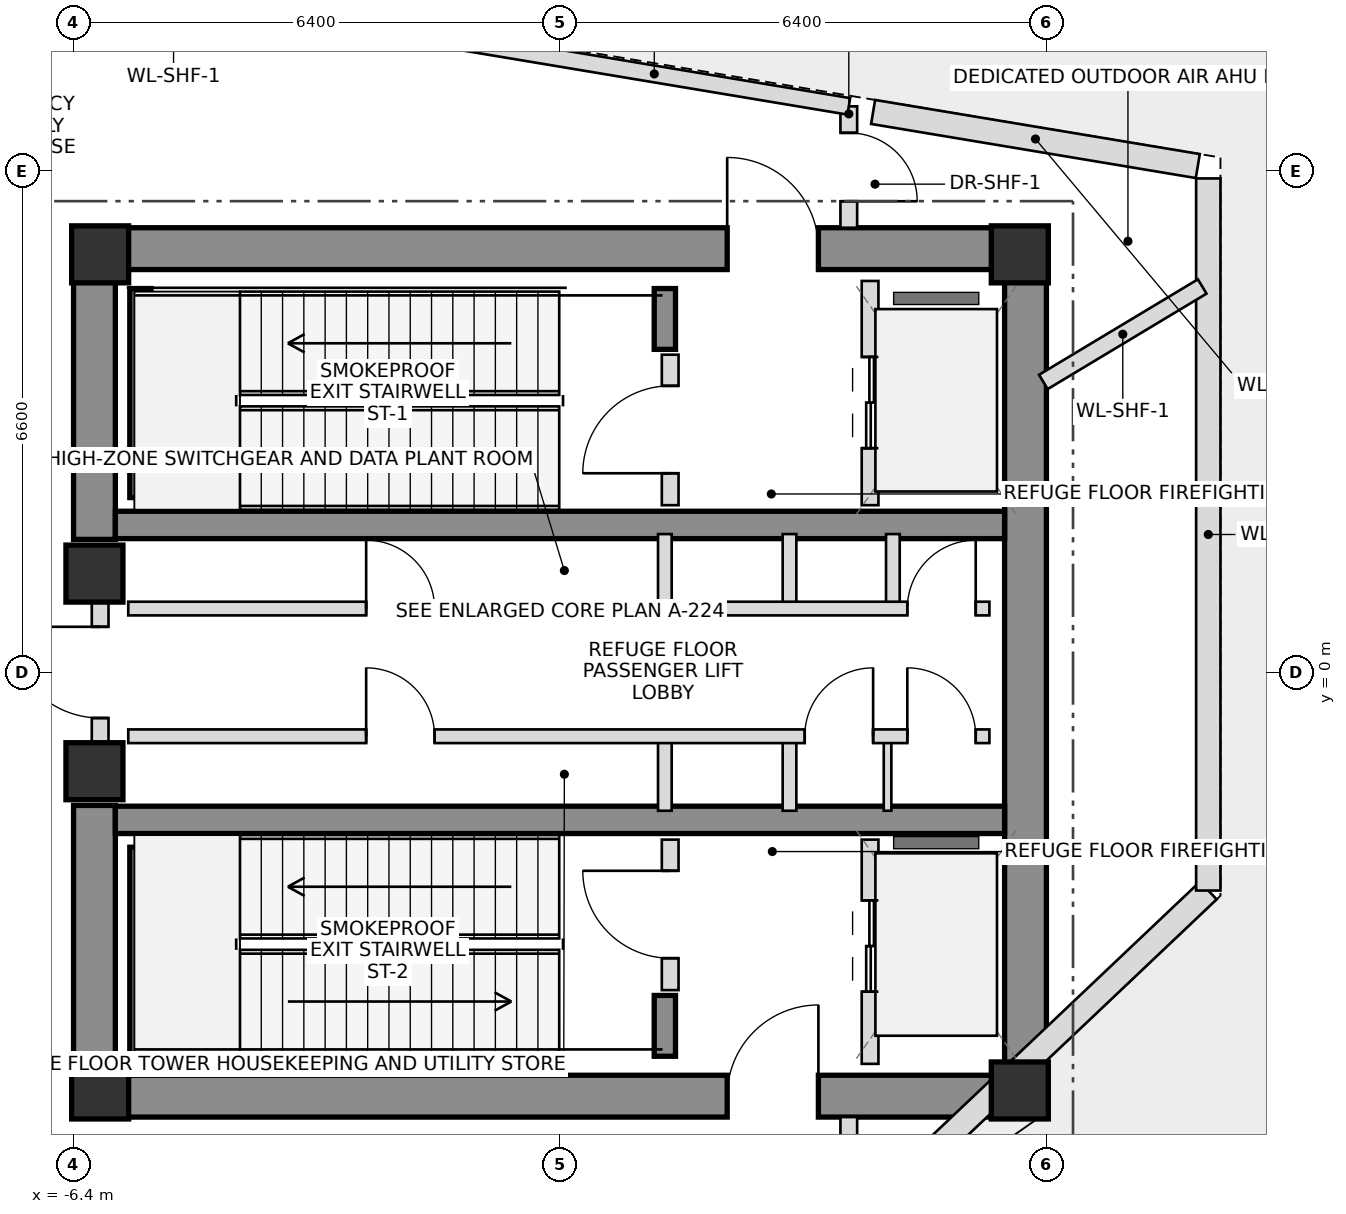
"""IFC4 building model, lengths in metres.
Left out: names, types, materials, properties, quantities, classifications, styles, units other than length and angle.
Written with IfcOpenShell. Run it as: python <this file> out.ifc"""

import sys

from ifc_helpers import new_model, si_unit, direction, frame, frame_2d, origin, origin_2d, place, context, subcontext, project, spatial, rectangle, extrude, source, transform, mapped, element, fill, save


model = new_model("IFC4")
c1 = context("Model", 3, precision=1e-05, world=origin(), true_north=direction((0.0, 1.0)))
c2 = subcontext(c1, "Body", "Model", "MODEL_VIEW")
j1 = project(units=[si_unit("LENGTHUNIT", "METRE"), si_unit("PLANEANGLEUNIT", "RADIAN")], contexts=[c1])
p1 = place(None, origin())
s1 = spatial("IfcSite", under=j1, at=p1, CompositionType="ELEMENT")
p2 = place(p1, origin())
s2 = spatial("IfcBuilding", under=s1, at=p2, CompositionType="ELEMENT")
p3 = place(p2, frame((0.0, 0.0, 252.45)))
s3 = spatial("IfcBuildingStorey", under=s2, at=p3, CompositionType="ELEMENT", Elevation=252.45)
m1 = source(origin(), c2, "Body", "SweptSolid", [
    extrude(rectangle(XDim=0.75, YDim=0.75, at=origin_2d()), origin(), (0.0, 0.0, 1.0), 5.1),
])
for number, where, z_axis, x_axis in (
    (1, (-6.05, -5.5, 0.0), (0.0, 0.0, 1.0), (1.0, 0.0, 0.0)),
    (2, (6.05, -5.5, 0.0), (0.0, 0.0, 1.0), (1.0, 0.0, 0.0)),
    (3, (6.05, 5.5, 0.0), (0.0, 0.0, 1.0), (1.0, 0.0, 0.0)),
    (4, (-6.05, 5.5, 0.0), (0.0, 0.0, 1.0), (1.0, 0.0, 0.0)),
):
    element("IfcColumn", number, at=place(p3, frame(where, z_axis=z_axis, x_axis=x_axis)), inside=s3, PredefinedType="COLUMN", context=c2, shape_type="MappedRepresentation", body=[
        mapped(m1, transform((0.0, 0.0, 0.0), scale=1.0)),
    ])
p4 = place(p3, frame((-6.4, 5.575, 0.0), z_axis=(0.0, 0.0, 1.0), x_axis=(1.0, 0.0, 0.0)))
e5 = element("IfcWall", 5, at=p4, inside=s3, PredefinedType="SHEAR", context=c2, shape_type="SweptSolid", body=[
    extrude(rectangle(XDim=12.8, YDim=0.55, at=frame_2d((6.4, 0.0))), origin(), (0.0, 0.0, 1.0), 5.1),
])
p5 = place(p4, frame((8.6, 0.0, 0.0)))
e6 = element("IfcOpeningElement", 6, at=p5, cuts=e5, PredefinedType="OPENING", context=c2, shape_type="SweptSolid", body=[
    extrude(rectangle(XDim=1.2, YDim=2.2, at=frame_2d((0.6, 1.1))), frame((0.0, 0.285, 0.0), z_axis=(0.0, -1.0, 0.0), x_axis=(1.0, 0.0, 0.0)), (0.0, 0.0, 1.0), 0.57),
])
p6 = place(p3, frame((-6.4, -5.575, 0.0), z_axis=(0.0, 0.0, 1.0), x_axis=(1.0, 0.0, 0.0)))
e7 = element("IfcWall", 7, at=p6, inside=s3, PredefinedType="SHEAR", context=c2, shape_type="SweptSolid", body=[
    extrude(rectangle(XDim=12.8, YDim=0.55, at=frame_2d((6.4, 0.0))), origin(), (0.0, 0.0, 1.0), 5.1),
])
p7 = place(p6, frame((8.6, 0.0, 0.0)))
e8 = element("IfcOpeningElement", 8, at=p7, cuts=e7, PredefinedType="OPENING", context=c2, shape_type="SweptSolid", body=[
    extrude(rectangle(XDim=1.2, YDim=2.2, at=frame_2d((0.6, 1.1))), frame((0.0, 0.285, 0.0), z_axis=(0.0, -1.0, 0.0), x_axis=(1.0, 0.0, 0.0)), (0.0, 0.0, 1.0), 0.57),
])
p8 = place(p3, frame((6.125, -5.3, 0.0), z_axis=(0.0, 0.0, 1.0), x_axis=(0.0, 1.0, 0.0)))
e9 = element("IfcWall", 9, at=p8, inside=s3, PredefinedType="SHEAR", context=c2, shape_type="SweptSolid", body=[
    extrude(rectangle(XDim=10.6, YDim=0.55, at=frame_2d((5.3, 0.0))), origin(), (0.0, 0.0, 1.0), 5.1),
])
for number, where, z_axis, x_axis in (
    (10, (-6.125, -5.3, 0.0), (0.0, 0.0, 1.0), (0.0, 1.0, 0.0)),
    (11, (-6.125, 1.75, 0.0), (0.0, 0.0, 1.0), (0.0, 1.0, 0.0)),
):
    element("IfcWall", number, at=place(p3, frame(where, z_axis=z_axis, x_axis=x_axis)), inside=s3, PredefinedType="SHEAR", context=c2, shape_type="SweptSolid", body=[
        extrude(rectangle(XDim=3.55, YDim=0.55, at=frame_2d((1.775, 0.0))), origin(), (0.0, 0.0, 1.0), 5.1),
    ])
for number, where, z_axis, x_axis in (
    (12, (-5.85, 1.94, 0.0), (0.0, 0.0, 1.0), (1.0, 0.0, 0.0)),
    (13, (-5.85, -1.94, 0.0), (0.0, 0.0, 1.0), (1.0, 0.0, 0.0)),
):
    element("IfcWall", number, at=place(p3, frame(where, z_axis=z_axis, x_axis=x_axis)), inside=s3, PredefinedType="SHEAR", context=c2, shape_type="SweptSolid", body=[
        extrude(rectangle(XDim=11.7, YDim=0.36, at=frame_2d((5.85, 0.0))), origin(), (0.0, 0.0, 1.0), 5.1),
    ])
p9 = place(p3, frame((-5.52, 2.3, 0.0), z_axis=(0.0, 0.0, 1.0), x_axis=(0.0, 1.0, 0.0)))
e14 = element("IfcWall", 14, at=p9, inside=s3, PredefinedType="SHEAR", context=c2, shape_type="SweptSolid", body=[
    extrude(rectangle(XDim=2.75, YDim=0.28, at=frame_2d((1.375, 0.0))), origin(), (0.0, 0.0, 1.0), 5.1),
])
p10 = place(p3, frame((1.38, 4.25, 0.0), z_axis=(0.0, 0.0, 1.0), x_axis=(0.0, 1.0, 0.0)))
e15 = element("IfcWall", 15, at=p10, inside=s3, PredefinedType="SHEAR", context=c2, shape_type="SweptSolid", body=[
    extrude(rectangle(XDim=0.8, YDim=0.28, at=frame_2d((0.4, 0.0))), origin(), (0.0, 0.0, 1.0), 5.1),
])
p11 = place(p3, frame((-5.52, -5.05, 0.0), z_axis=(0.0, 0.0, 1.0), x_axis=(0.0, 1.0, 0.0)))
e16 = element("IfcWall", 16, at=p11, inside=s3, PredefinedType="SHEAR", context=c2, shape_type="SweptSolid", body=[
    extrude(rectangle(XDim=2.75, YDim=0.28, at=frame_2d((1.375, 0.0))), origin(), (0.0, 0.0, 1.0), 5.1),
])
p12 = place(p3, frame((1.38, -5.05, 0.0), z_axis=(0.0, 0.0, 1.0), x_axis=(0.0, 1.0, 0.0)))
e17 = element("IfcWall", 17, at=p12, inside=s3, PredefinedType="SHEAR", context=c2, shape_type="SweptSolid", body=[
    extrude(rectangle(XDim=0.8, YDim=0.28, at=frame_2d((0.4, 0.0))), origin(), (0.0, 0.0, 1.0), 5.1),
])
for number, where, z_axis, x_axis in (
    (18, (-6.125, -1.3, 0.0), (0.0, 0.0, 1.0), (1.0, 0.0, 0.0)),
    (19, (-6.125, 1.3, 0.0), (0.0, 0.0, 1.0), (1.0, 0.0, 0.0)),
):
    element("IfcColumn", number, at=place(p3, frame(where, z_axis=z_axis, x_axis=x_axis)), inside=s3, PredefinedType="COLUMN", context=c2, shape_type="MappedRepresentation", body=[
        mapped(m1, transform((0.0, 0.0, 0.0), scale=1.0)),
    ])
p13 = place(p3, frame((-6.05, -0.95, 0.0), z_axis=(0.0, 0.0, 1.0), x_axis=(0.0, 1.0, 0.0)))
e20 = element("IfcWall", 20, at=p13, inside=s3, PredefinedType="PLUMBINGWALL", context=c2, shape_type="SweptSolid", body=[
    extrude(rectangle(XDim=1.9, YDim=0.22, at=frame_2d((0.95, 0.0))), origin(), (0.0, 0.0, 1.0), 3.88),
])
p14 = place(p13, frame((0.35, 0.0, 0.0)))
e21 = element("IfcOpeningElement", 21, at=p14, cuts=e20, PredefinedType="OPENING", context=c2, shape_type="SweptSolid", body=[
    extrude(rectangle(XDim=1.2, YDim=2.2, at=frame_2d((0.6, 1.1))), frame((0.0, 0.12, 0.0), z_axis=(0.0, -1.0, 0.0), x_axis=(1.0, 0.0, 0.0)), (0.0, 0.0, 1.0), 0.24),
])
p15 = place(p3, frame((1.45, 2.2, 0.0), z_axis=(0.0, 0.0, 1.0), x_axis=(0.0, 1.0, 0.0)))
e22 = element("IfcWall", 22, at=p15, inside=s3, PredefinedType="PLUMBINGWALL", context=c2, shape_type="SweptSolid", body=[
    extrude(rectangle(XDim=1.98, YDim=0.22, at=frame_2d((0.99, 0.0))), origin(), (0.0, 0.0, 1.0), 4.9),
])
p16 = place(p15, frame((0.42, 0.0, 0.0)))
e23 = element("IfcOpeningElement", 23, at=p16, cuts=e22, PredefinedType="OPENING", context=c2, shape_type="SweptSolid", body=[
    extrude(rectangle(XDim=1.15, YDim=2.15, at=frame_2d((0.575, 1.075))), frame((0.0, 0.12, 0.0), z_axis=(0.0, -1.0, 0.0), x_axis=(1.0, 0.0, 0.0)), (0.0, 0.0, 1.0), 0.24),
])
p17 = place(p3, frame((4.08, 2.2, 0.0), z_axis=(0.0, 0.0, 1.0), x_axis=(0.0, 1.0, 0.0)))
e24 = element("IfcWall", 24, at=p17, inside=s3, PredefinedType="PLUMBINGWALL", context=c2, shape_type="SweptSolid", body=[
    extrude(rectangle(XDim=2.95, YDim=0.22, at=frame_2d((1.475, 0.0))), origin(), (0.0, 0.0, 1.0), 4.9),
])
p18 = place(p17, frame((0.75, 0.0, 0.0)))
e25 = element("IfcOpeningElement", 25, at=p18, cuts=e24, PredefinedType="OPENING", context=c2, shape_type="SweptSolid", body=[
    extrude(rectangle(XDim=1.2, YDim=2.25, at=frame_2d((0.6, 1.125))), frame((0.0, 0.12, 0.0), z_axis=(0.0, -1.0, 0.0), x_axis=(1.0, 0.0, 0.0)), (0.0, 0.0, 1.0), 0.24),
])
p19 = place(p3, frame((1.45, -4.18, 0.0), z_axis=(0.0, 0.0, 1.0), x_axis=(0.0, 1.0, 0.0)))
e26 = element("IfcWall", 26, at=p19, inside=s3, PredefinedType="PLUMBINGWALL", context=c2, shape_type="SweptSolid", body=[
    extrude(rectangle(XDim=1.98, YDim=0.22, at=frame_2d((0.99, 0.0))), origin(), (0.0, 0.0, 1.0), 4.9),
])
p20 = place(p19, frame((0.42, 0.0, 0.0)))
e27 = element("IfcOpeningElement", 27, at=p20, cuts=e26, PredefinedType="OPENING", context=c2, shape_type="SweptSolid", body=[
    extrude(rectangle(XDim=1.15, YDim=2.15, at=frame_2d((0.575, 1.075))), frame((0.0, 0.12, 0.0), z_axis=(0.0, -1.0, 0.0), x_axis=(1.0, 0.0, 0.0)), (0.0, 0.0, 1.0), 0.24),
])
p21 = place(p3, frame((4.08, -5.15, 0.0), z_axis=(0.0, 0.0, 1.0), x_axis=(0.0, 1.0, 0.0)))
e28 = element("IfcWall", 28, at=p21, inside=s3, PredefinedType="PLUMBINGWALL", context=c2, shape_type="SweptSolid", body=[
    extrude(rectangle(XDim=2.95, YDim=0.22, at=frame_2d((1.475, 0.0))), origin(), (0.0, 0.0, 1.0), 4.9),
])
p22 = place(p21, frame((0.95, 0.0, 0.0)))
e29 = element("IfcOpeningElement", 29, at=p22, cuts=e28, PredefinedType="OPENING", context=c2, shape_type="SweptSolid", body=[
    extrude(rectangle(XDim=1.2, YDim=2.25, at=frame_2d((0.6, 1.125))), frame((0.0, 0.12, 0.0), z_axis=(0.0, -1.0, 0.0), x_axis=(1.0, 0.0, 0.0)), (0.0, 0.0, 1.0), 0.24),
])
for number, where, z_axis, x_axis in (
    (30, (1.38, 0.84, 0.0), (0.0, 0.0, 1.0), (0.0, 1.0, 0.0)),
    (31, (1.38, -1.82, 0.0), (0.0, 0.0, 1.0), (0.0, 1.0, 0.0)),
    (32, (3.02, 0.84, 0.0), (0.0, 0.0, 1.0), (0.0, 1.0, 0.0)),
    (33, (4.38, 0.84, 0.0), (0.0, 0.0, 1.0), (0.0, 1.0, 0.0)),
    (34, (3.02, -1.82, 0.0), (0.0, 0.0, 1.0), (0.0, 1.0, 0.0)),
):
    element("IfcWall", number, at=place(p3, frame(where, z_axis=z_axis, x_axis=x_axis)), inside=s3, PredefinedType="PLUMBINGWALL", context=c2, shape_type="SweptSolid", body=[
        extrude(rectangle(XDim=0.98, YDim=0.18, at=frame_2d((0.49, 0.0))), origin(), (0.0, 0.0, 1.0), 4.9),
    ])
p23 = place(p3, frame((4.31, -1.82, 0.0), z_axis=(0.0, 0.0, 1.0), x_axis=(0.0, 1.0, 0.0)))
e35 = element("IfcWall", 35, at=p23, inside=s3, PredefinedType="PARTITIONING", context=c2, shape_type="SweptSolid", body=[
    extrude(rectangle(XDim=0.98, YDim=0.1, at=frame_2d((0.49, 0.0))), origin(), (0.0, 0.0, 1.0), 4.9),
])
p24 = place(p3, frame((-5.68, 0.84, 0.0), z_axis=(0.0, 0.0, 1.0), x_axis=(1.0, 0.0, 0.0)))
e36 = element("IfcWall", 36, at=p24, inside=s3, PredefinedType="PLUMBINGWALL", context=c2, shape_type="SweptSolid", body=[
    extrude(rectangle(XDim=11.33, YDim=0.18, at=frame_2d((5.665, 0.0))), origin(), (0.0, 0.0, 1.0), 4.9),
])
p25 = place(p24, frame((3.13, 0.0, 0.0)))
e37 = element("IfcOpeningElement", 37, at=p25, cuts=e36, PredefinedType="OPENING", context=c2, shape_type="SweptSolid", body=[
    extrude(rectangle(XDim=0.9, YDim=2.05, at=frame_2d((0.45, 1.025))), frame((0.0, 0.1, 0.0), z_axis=(0.0, -1.0, 0.0), x_axis=(1.0, 0.0, 0.0)), (0.0, 0.0, 1.0), 0.2),
])
p26 = place(p24, frame((10.25, 0.0, 0.0)))
e38 = element("IfcOpeningElement", 38, at=p26, cuts=e36, PredefinedType="OPENING", context=c2, shape_type="SweptSolid", body=[
    extrude(rectangle(XDim=0.9, YDim=2.05, at=frame_2d((0.45, 1.025))), frame((0.0, 0.1, 0.0), z_axis=(0.0, -1.0, 0.0), x_axis=(1.0, 0.0, 0.0)), (0.0, 0.0, 1.0), 0.2),
])
p27 = place(p3, frame((-5.68, -0.84, 0.0), z_axis=(0.0, 0.0, 1.0), x_axis=(1.0, 0.0, 0.0)))
e39 = element("IfcWall", 39, at=p27, inside=s3, PredefinedType="PLUMBINGWALL", context=c2, shape_type="SweptSolid", body=[
    extrude(rectangle(XDim=11.33, YDim=0.18, at=frame_2d((5.665, 0.0))), origin(), (0.0, 0.0, 1.0), 4.9),
])
p28 = place(p27, frame((3.13, 0.0, 0.0)))
e40 = element("IfcOpeningElement", 40, at=p28, cuts=e39, PredefinedType="OPENING", context=c2, shape_type="SweptSolid", body=[
    extrude(rectangle(XDim=0.9, YDim=2.05, at=frame_2d((0.45, 1.025))), frame((0.0, 0.1, 0.0), z_axis=(0.0, -1.0, 0.0), x_axis=(1.0, 0.0, 0.0)), (0.0, 0.0, 1.0), 0.2),
])
p29 = place(p27, frame((8.9, 0.0, 0.0)))
e41 = element("IfcOpeningElement", 41, at=p29, cuts=e39, PredefinedType="OPENING", context=c2, shape_type="SweptSolid", body=[
    extrude(rectangle(XDim=0.9, YDim=2.05, at=frame_2d((0.45, 1.025))), frame((0.0, 0.1, 0.0), z_axis=(0.0, -1.0, 0.0), x_axis=(1.0, 0.0, 0.0)), (0.0, 0.0, 1.0), 0.2),
])
p30 = place(p27, frame((10.25, 0.0, 0.0)))
e42 = element("IfcOpeningElement", 42, at=p30, cuts=e39, PredefinedType="OPENING", context=c2, shape_type="SweptSolid", body=[
    extrude(rectangle(XDim=0.9, YDim=2.05, at=frame_2d((0.45, 1.025))), frame((0.0, 0.1, 0.0), z_axis=(0.0, -1.0, 0.0), x_axis=(1.0, 0.0, 0.0)), (0.0, 0.0, 1.0), 0.2),
])
p31 = place(p3, frame((8.53, -2.87, 0.0), z_axis=(0.0, 0.0, 1.0), x_axis=(-0.725858697409, -0.687843842304, 0.0)))
e43 = element("IfcWall", 43, at=p31, inside=s3, PredefinedType="SOLIDWALL", context=c2, shape_type="SweptSolid", body=[
    extrude(rectangle(XDim=6.075, YDim=0.32, at=frame_2d((3.038, 0.0))), origin(), (0.0, 0.0, 1.0), 4.305),
])
p32 = place(p3, frame((4.12, 7.374, 0.0), z_axis=(0.0, 0.0, 1.0), x_axis=(0.986404587418, -0.164334992989, 0.0)))
e44 = element("IfcWall", 44, at=p32, inside=s3, PredefinedType="SOLIDWALL", context=c2, shape_type="SweptSolid", body=[
    extrude(rectangle(XDim=4.331, YDim=0.32, at=frame_2d((2.165, 0.0))), origin(), (0.0, 0.0, 1.0), 3.555),
])
p33 = place(p3, frame((8.53, 6.499, 0.0), z_axis=(0.0, 0.0, 1.0), x_axis=(0.0, -1.0, 0.0)))
e45 = element("IfcWall", 45, at=p33, inside=s3, PredefinedType="SOLIDWALL", context=c2, shape_type="SweptSolid", body=[
    extrude(rectangle(XDim=9.369, YDim=0.32, at=frame_2d((4.684, 0.0))), origin(), (0.0, 0.0, 1.0), 4.9),
])
p34 = place(p3, frame((6.36, 3.822, 0.0), z_axis=(0.0, 0.0, 1.0), x_axis=(0.857139312481, 0.515084652266, 0.0)))
e46 = element("IfcWall", 46, at=p34, inside=s3, PredefinedType="PLUMBINGWALL", context=c2, shape_type="SweptSolid", body=[
    extrude(rectangle(XDim=2.438, YDim=0.22, at=frame_2d((1.219, 0.0))), origin(), (0.0, 0.0, 1.0), 4.9),
])
p35 = place(p3, frame((3.8, 7.447, 0.0), z_axis=(0.0, 0.0, 1.0), x_axis=(0.0, -1.0, 0.0)))
e47 = element("IfcWall", 47, at=p35, inside=s3, PredefinedType="PLUMBINGWALL", context=c2, shape_type="SweptSolid", body=[
    extrude(rectangle(XDim=1.597, YDim=0.22, at=frame_2d((0.799, 0.0))), origin(), (0.0, 0.0, 1.0), 4.9),
])
p36 = place(p35, frame((0.349, 0.0, 0.0)))
e48 = element("IfcOpeningElement", 48, at=p36, cuts=e47, PredefinedType="OPENING", context=c2, shape_type="SweptSolid", body=[
    extrude(rectangle(XDim=0.9, YDim=2.05, at=frame_2d((0.45, 1.025))), frame((0.0, 0.12, 0.0), z_axis=(0.0, -1.0, 0.0), x_axis=(1.0, 0.0, 0.0)), (0.0, 0.0, 1.0), 0.24),
])
p37 = place(p3, frame((3.8, -5.85, 0.0), z_axis=(0.0, 0.0, 1.0), x_axis=(0.0, -1.0, 0.0)))
e49 = element("IfcWall", 49, at=p37, inside=s3, PredefinedType="PLUMBINGWALL", context=c2, shape_type="SweptSolid", body=[
    extrude(rectangle(XDim=1.53, YDim=0.22, at=frame_2d((0.765, 0.0))), origin(), (0.0, 0.0, 1.0), 4.9),
])
p38 = place(p3, frame((-1.318, 8.3, 0.0), z_axis=(0.0, 0.0, 1.0), x_axis=(0.98640155285, -0.164353206645, 0.0)))
e50 = element("IfcWall", 50, at=p38, inside=s3, PredefinedType="PLUMBINGWALL", context=c2, shape_type="SweptSolid", body=[
    extrude(rectangle(XDim=5.189, YDim=0.22, at=frame_2d((2.594, 0.0))), origin(), (0.0, 0.0, 1.0), 4.9),
])
p39 = place(p5, origin())
e51 = element("IfcDoor", 51, at=p39, inside=s3, OperationType="SINGLE_SWING_LEFT", PredefinedType="DOOR", context=c2, shape_type="SweptSolid", body=[
    extrude(rectangle(XDim=1.2, YDim=2.2, at=frame_2d((0.6, 1.1))), frame((0.0, 0.025, 0.0), z_axis=(0.0, -1.0, 0.0), x_axis=(1.0, 0.0, 0.0)), (0.0, 0.0, 1.0), 0.05),
])
fill(e6, e51)
p40 = place(p7, origin())
e52 = element("IfcDoor", 52, at=p40, inside=s3, OperationType="SINGLE_SWING_RIGHT", PredefinedType="DOOR", context=c2, shape_type="SweptSolid", body=[
    extrude(rectangle(XDim=1.2, YDim=2.2, at=frame_2d((0.6, 1.1))), frame((0.0, 0.025, 0.0), z_axis=(0.0, -1.0, 0.0), x_axis=(1.0, 0.0, 0.0)), (0.0, 0.0, 1.0), 0.05),
])
fill(e8, e52)
p41 = place(p14, origin())
e53 = element("IfcDoor", 53, at=p41, inside=s3, OperationType="SINGLE_SWING_RIGHT", PredefinedType="DOOR", context=c2, shape_type="SweptSolid", body=[
    extrude(rectangle(XDim=1.2, YDim=2.2, at=frame_2d((0.6, 1.1))), frame((0.0, 0.025, 0.0), z_axis=(0.0, -1.0, 0.0), x_axis=(1.0, 0.0, 0.0)), (0.0, 0.0, 1.0), 0.05),
])
fill(e21, e53)
p42 = place(p16, origin())
e54 = element("IfcDoor", 54, at=p42, inside=s3, OperationType="SINGLE_SWING_LEFT", PredefinedType="DOOR", context=c2, shape_type="SweptSolid", body=[
    extrude(rectangle(XDim=1.15, YDim=2.15, at=frame_2d((0.575, 1.075))), frame((0.0, 0.025, 0.0), z_axis=(0.0, -1.0, 0.0), x_axis=(1.0, 0.0, 0.0)), (0.0, 0.0, 1.0), 0.05),
])
fill(e23, e54)
p43 = place(p18, origin())
e55 = element("IfcDoor", 55, at=p43, inside=s3, OperationType="DOUBLE_DOOR_SLIDING", PredefinedType="DOOR", context=c2, shape_type="SweptSolid", body=[
    extrude(rectangle(XDim=1.2, YDim=2.25, at=frame_2d((0.6, 1.125))), frame((0.0, 0.025, 0.0), z_axis=(0.0, -1.0, 0.0), x_axis=(1.0, 0.0, 0.0)), (0.0, 0.0, 1.0), 0.05),
])
fill(e25, e55)
p44 = place(p20, origin())
e56 = element("IfcDoor", 56, at=p44, inside=s3, OperationType="SINGLE_SWING_RIGHT", PredefinedType="DOOR", context=c2, shape_type="SweptSolid", body=[
    extrude(rectangle(XDim=1.15, YDim=2.15, at=frame_2d((0.575, 1.075))), frame((0.0, 0.025, 0.0), z_axis=(0.0, -1.0, 0.0), x_axis=(1.0, 0.0, 0.0)), (0.0, 0.0, 1.0), 0.05),
])
fill(e27, e56)
p45 = place(p22, origin())
e57 = element("IfcDoor", 57, at=p45, inside=s3, OperationType="DOUBLE_DOOR_SLIDING", PredefinedType="DOOR", context=c2, shape_type="SweptSolid", body=[
    extrude(rectangle(XDim=1.2, YDim=2.25, at=frame_2d((0.6, 1.125))), frame((0.0, 0.025, 0.0), z_axis=(0.0, -1.0, 0.0), x_axis=(1.0, 0.0, 0.0)), (0.0, 0.0, 1.0), 0.05),
])
fill(e29, e57)
p46 = place(p25, origin())
e58 = element("IfcDoor", 58, at=p46, inside=s3, OperationType="SINGLE_SWING_LEFT", PredefinedType="DOOR", context=c2, shape_type="SweptSolid", body=[
    extrude(rectangle(XDim=0.9, YDim=2.05, at=frame_2d((0.45, 1.025))), frame((0.0, 0.025, 0.0), z_axis=(0.0, -1.0, 0.0), x_axis=(1.0, 0.0, 0.0)), (0.0, 0.0, 1.0), 0.05),
])
fill(e37, e58)
p47 = place(p26, origin())
e59 = element("IfcDoor", 59, at=p47, inside=s3, OperationType="SINGLE_SWING_RIGHT", PredefinedType="DOOR", context=c2, shape_type="SweptSolid", body=[
    extrude(rectangle(XDim=0.9, YDim=2.05, at=frame_2d((0.45, 1.025))), frame((0.0, 0.025, 0.0), z_axis=(0.0, -1.0, 0.0), x_axis=(1.0, 0.0, 0.0)), (0.0, 0.0, 1.0), 0.05),
])
fill(e38, e59)
p48 = place(p28, origin())
e60 = element("IfcDoor", 60, at=p48, inside=s3, OperationType="SINGLE_SWING_LEFT", PredefinedType="DOOR", context=c2, shape_type="SweptSolid", body=[
    extrude(rectangle(XDim=0.9, YDim=2.05, at=frame_2d((0.45, 1.025))), frame((0.0, 0.025, 0.0), z_axis=(0.0, -1.0, 0.0), x_axis=(1.0, 0.0, 0.0)), (0.0, 0.0, 1.0), 0.05),
])
fill(e40, e60)
p49 = place(p29, origin())
e61 = element("IfcDoor", 61, at=p49, inside=s3, OperationType="SINGLE_SWING_RIGHT", PredefinedType="DOOR", context=c2, shape_type="SweptSolid", body=[
    extrude(rectangle(XDim=0.9, YDim=2.05, at=frame_2d((0.45, 1.025))), frame((0.0, 0.025, 0.0), z_axis=(0.0, -1.0, 0.0), x_axis=(1.0, 0.0, 0.0)), (0.0, 0.0, 1.0), 0.05),
])
fill(e41, e61)
p50 = place(p30, origin())
e62 = element("IfcDoor", 62, at=p50, inside=s3, OperationType="SINGLE_SWING_LEFT", PredefinedType="DOOR", context=c2, shape_type="SweptSolid", body=[
    extrude(rectangle(XDim=0.9, YDim=2.05, at=frame_2d((0.45, 1.025))), frame((0.0, 0.025, 0.0), z_axis=(0.0, -1.0, 0.0), x_axis=(1.0, 0.0, 0.0)), (0.0, 0.0, 1.0), 0.05),
])
fill(e42, e62)
p51 = place(p36, origin())
e63 = element("IfcDoor", 63, at=p51, inside=s3, OperationType="SINGLE_SWING_RIGHT", PredefinedType="DOOR", context=c2, shape_type="SweptSolid", body=[
    extrude(rectangle(XDim=0.9, YDim=2.05, at=frame_2d((0.45, 1.025))), frame((0.0, 0.025, 0.0), z_axis=(0.0, -1.0, 0.0), x_axis=(1.0, 0.0, 0.0)), (0.0, 0.0, 1.0), 0.05),
])
fill(e48, e63)
save(model, sys.argv[1])
